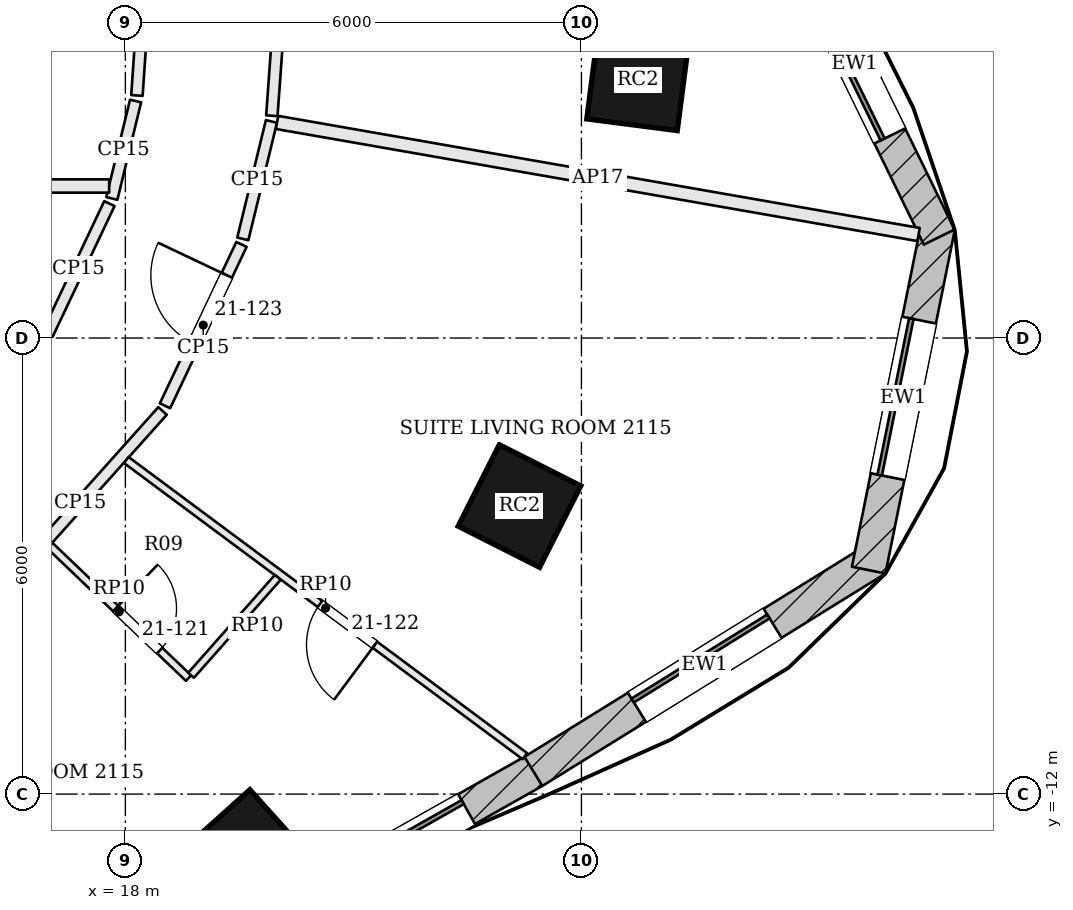
"""IFC4 building model, lengths in metres.
Left out: names, types, materials, properties, quantities, classifications, styles, units other than length and angle.
Written with IfcOpenShell. Run it as: python <this file> out.ifc"""

import sys

from ifc_helpers import new_model, si_unit, direction, frame, frame_2d, origin, origin_2d, place, context, subcontext, project, spatial, rectangle, extrude, element, fill, save


model = new_model("IFC4")
c1 = context("Model", 3, precision=1e-05, world=origin(), true_north=direction((0.0, 1.0)))
c2 = subcontext(c1, "Body", "Model", "MODEL_VIEW")
j1 = project(units=[si_unit("LENGTHUNIT", "METRE"), si_unit("PLANEANGLEUNIT", "RADIAN")], contexts=[c1])
p1 = place(None, origin())
s1 = spatial("IfcSite", under=j1, at=p1, CompositionType="ELEMENT")
p2 = place(p1, origin())
s2 = spatial("IfcBuilding", under=s1, at=p2, CompositionType="ELEMENT")
p3 = place(p2, frame((0.0, 0.0, 92.4)))
s3 = spatial("IfcBuildingStorey", under=s2, at=p3, CompositionType="ELEMENT", Elevation=92.4)
for number, where, z_axis, x_axis in (
    (1, (19.593, -12.79, 0.0), (0.0, 0.0, 1.0), (0.744, 0.668, 0.0)),
    (2, (23.185, -8.21, 0.0), (0.0, 0.0, 1.0), (0.451, 0.893, 0.0)),
    (3, (24.743, -2.599, 0.0), (0.0, 0.0, 1.0), (0.128, 0.992, 0.0)),
):
    element("IfcColumn", number, at=place(p3, frame(where, z_axis=z_axis, x_axis=x_axis)), inside=s3, PredefinedType="COLUMN", context=c2, shape_type="SweptSolid", body=[
        extrude(rectangle(XDim=1.2, YDim=1.2, at=origin_2d()), origin(), (0.0, 0.0, 1.0), 3.6),
    ])
p4 = place(p3, frame((19.776, -13.731, 0.0), z_axis=(0.0, 0.0, 1.0), x_axis=(0.870610133829, 0.491973571318, 0.0)))
e4 = element("IfcWall", 4, at=p4, inside=s3, PredefinedType="SOLIDWALL", context=c2, shape_type="SweptSolid", body=[
    extrude(rectangle(XDim=4.134, YDim=0.45, at=frame_2d((2.067, 0.0))), origin(), (0.0, 0.0, 1.0), 3.4),
])
p5 = place(p4, frame((1.017, 0.0, 0.9)))
e5 = element("IfcOpeningElement", 5, at=p5, cuts=e4, PredefinedType="OPENING", context=c2, shape_type="SweptSolid", body=[
    extrude(rectangle(XDim=2.1, YDim=2.0, at=frame_2d((1.05, 1.0))), frame((0.0, 0.235, 0.0), z_axis=(0.0, -1.0, 0.0), x_axis=(1.0, 0.0, 0.0)), (0.0, 0.0, 1.0), 0.47),
])
p6 = place(p3, frame((23.368, -11.701, 0.0), z_axis=(0.0, 0.0, 1.0), x_axis=(0.850251408633, 0.526376806211, 0.0)))
e6 = element("IfcWall", 6, at=p6, inside=s3, PredefinedType="SOLIDWALL", context=c2, shape_type="SweptSolid", body=[
    extrude(rectangle(XDim=5.302, YDim=0.45, at=frame_2d((2.651, 0.0))), origin(), (0.0, 0.0, 1.0), 3.4),
])
p7 = place(p6, frame((1.601, 0.0, 0.9)))
e7 = element("IfcOpeningElement", 7, at=p7, cuts=e6, PredefinedType="OPENING", context=c2, shape_type="SweptSolid", body=[
    extrude(rectangle(XDim=2.1, YDim=2.0, at=frame_2d((1.05, 1.0))), frame((0.0, 0.235, 0.0), z_axis=(0.0, -1.0, 0.0), x_axis=(1.0, 0.0, 0.0)), (0.0, 0.0, 1.0), 0.47),
])
p8 = place(p3, frame((27.78, -9.053, 0.0), z_axis=(0.0, 0.0, 1.0), x_axis=(0.197796229105, 0.980243159503, 0.0)))
e8 = element("IfcWall", 8, at=p8, inside=s3, PredefinedType="SOLIDWALL", context=c2, shape_type="SweptSolid", body=[
    extrude(rectangle(XDim=4.61, YDim=0.45, at=frame_2d((2.305, 0.0))), origin(), (0.0, 0.0, 1.0), 3.4),
])
p9 = place(p8, frame((1.255, 0.0, 0.9)))
e9 = element("IfcOpeningElement", 9, at=p9, cuts=e8, PredefinedType="OPENING", context=c2, shape_type="SweptSolid", body=[
    extrude(rectangle(XDim=2.1, YDim=2.0, at=frame_2d((1.05, 1.0))), frame((0.0, 0.235, 0.0), z_axis=(0.0, -1.0, 0.0), x_axis=(1.0, 0.0, 0.0)), (0.0, 0.0, 1.0), 0.47),
])
p10 = place(p3, frame((28.707, -4.672, 0.0), z_axis=(0.0, 0.0, 1.0), x_axis=(-0.439053549989, 0.898460895221, 0.0)))
e10 = element("IfcWall", 10, at=p10, inside=s3, PredefinedType="SOLIDWALL", context=c2, shape_type="SweptSolid", body=[
    extrude(rectangle(XDim=5.062, YDim=0.45, at=frame_2d((2.531, 0.0))), origin(), (0.0, 0.0, 1.0), 3.4),
])
p11 = place(p10, frame((1.481, 0.0, 0.9)))
e11 = element("IfcOpeningElement", 11, at=p11, cuts=e10, PredefinedType="OPENING", context=c2, shape_type="SweptSolid", body=[
    extrude(rectangle(XDim=2.1, YDim=2.0, at=frame_2d((1.05, 1.0))), frame((0.0, 0.235, 0.0), z_axis=(0.0, -1.0, 0.0), x_axis=(1.0, 0.0, 0.0)), (0.0, 0.0, 1.0), 0.47),
])
p12 = place(p3, frame((17.193, -17.36, 0.0), z_axis=(0.0, 0.0, 1.0), x_axis=(-0.464005717448, 0.8858322043, 0.0)))
e12 = element("IfcWall", 12, at=p12, inside=s3, PredefinedType="PARTITIONING", context=c2, shape_type="SweptSolid", body=[
    extrude(rectangle(XDim=7.143, YDim=0.175, at=frame_2d((3.571, 0.0))), origin(), (0.0, 0.0, 1.0), 2.784),
])
p13 = place(p3, frame((16.321, -9.383, 0.0), z_axis=(0.0, 0.0, 1.0), x_axis=(0.666834356165, 0.745205972492, 0.0)))
e13 = element("IfcWall", 13, at=p13, inside=s3, PredefinedType="PARTITIONING", context=c2, shape_type="SweptSolid", body=[
    extrude(rectangle(XDim=3.252, YDim=0.15, at=frame_2d((1.626, 0.0))), origin(), (0.0, 0.0, 1.0), 2.784),
])
p14 = place(p3, frame((18.522, -6.891, 0.0), z_axis=(0.0, 0.0, 1.0), x_axis=(0.428157819028, 0.903703979191, 0.0)))
e14 = element("IfcWall", 14, at=p14, inside=s3, PredefinedType="PARTITIONING", context=c2, shape_type="SweptSolid", body=[
    extrude(rectangle(XDim=2.349, YDim=0.15, at=frame_2d((1.175, 0.0))), origin(), (0.0, 0.0, 1.0), 2.784),
])
p15 = place(p14, frame((0.9, 0.0, 0.0)))
e15 = element("IfcOpeningElement", 15, at=p15, cuts=e14, PredefinedType="OPENING", context=c2, shape_type="SweptSolid", body=[
    extrude(rectangle(XDim=1.0, YDim=2.1, at=frame_2d((0.5, 1.05))), frame((0.0, 0.085, 0.0), z_axis=(0.0, -1.0, 0.0), x_axis=(1.0, 0.0, 0.0)), (0.0, 0.0, 1.0), 0.17),
])
p16 = place(p3, frame((19.545, -4.696, 0.0), z_axis=(0.0, 0.0, 1.0), x_axis=(0.236715862945, 0.971578921257, 0.0)))
e16 = element("IfcWall", 16, at=p16, inside=s3, PredefinedType="PARTITIONING", context=c2, shape_type="SweptSolid", body=[
    extrude(rectangle(XDim=1.59, YDim=0.15, at=frame_2d((0.795, 0.0))), origin(), (0.0, 0.0, 1.0), 2.784),
])
p17 = place(p3, frame((28.436, -4.638, 0.0), z_axis=(0.0, 0.0, 1.0), x_axis=(-0.985072773891, 0.172138404023, 0.0)))
e17 = element("IfcWall", 17, at=p17, inside=s3, PredefinedType="PARTITIONING", context=c2, shape_type="SweptSolid", body=[
    extrude(rectangle(XDim=8.568, YDim=0.175, at=frame_2d((4.284, 0.0))), origin(), (0.0, 0.0, 1.0), 2.784),
])
p18 = place(p3, frame((19.927, -3.076, 0.0), z_axis=(0.0, 0.0, 1.0), x_axis=(0.071888451482, 0.997412678155, 0.0)))
e18 = element("IfcWall", 18, at=p18, inside=s3, PredefinedType="PARTITIONING", context=c2, shape_type="SweptSolid", body=[
    extrude(rectangle(XDim=3.084, YDim=0.15, at=frame_2d((1.542, 0.0))), origin(), (0.0, 0.0, 1.0), 2.784),
])
p19 = place(p3, frame((18.34, -0.075, 0.0), z_axis=(0.0, 0.0, 1.0), x_axis=(-0.068328193832, -0.997662897941, 0.0)))
e19 = element("IfcWall", 19, at=p19, inside=s3, PredefinedType="PARTITIONING", context=c2, shape_type="SweptSolid", body=[
    extrude(rectangle(XDim=2.74, YDim=0.15, at=frame_2d((1.37, 0.0))), origin(), (0.0, 0.0, 1.0), 2.784),
])
p20 = place(p3, frame((18.135, -2.882, 0.0), z_axis=(0.0, 0.0, 1.0), x_axis=(-0.236653741324, -0.971594054489, 0.0)))
e20 = element("IfcWall", 20, at=p20, inside=s3, PredefinedType="PARTITIONING", context=c2, shape_type="SweptSolid", body=[
    extrude(rectangle(XDim=1.32, YDim=0.15, at=frame_2d((0.66, 0.0))), origin(), (0.0, 0.0, 1.0), 2.784),
])
p21 = place(p3, frame((17.79, -4.231, 0.0), z_axis=(0.0, 0.0, 1.0), x_axis=(-0.428042272357, -0.90375871397, 0.0)))
e21 = element("IfcWall", 21, at=p21, inside=s3, PredefinedType="PARTITIONING", context=c2, shape_type="SweptSolid", body=[
    extrude(rectangle(XDim=1.905, YDim=0.15, at=frame_2d((0.953, 0.0))), origin(), (0.0, 0.0, 1.0), 2.784),
])
p22 = place(p3, frame((23.256, -11.501, 0.0), z_axis=(0.0, 0.0, 1.0), x_axis=(-0.802700401869, 0.596382482003, 0.0)))
e22 = element("IfcWall", 22, at=p22, inside=s3, PredefinedType="PARTITIONING", context=c2, shape_type="SweptSolid", body=[
    extrude(rectangle(XDim=6.533, YDim=0.1, at=frame_2d((3.267, 0.0))), origin(), (0.0, 0.0, 1.0), 2.884),
])
p23 = place(p22, frame((2.458, 0.0, 0.0)))
e23 = element("IfcOpeningElement", 23, at=p23, cuts=e22, PredefinedType="OPENING", context=c2, shape_type="SweptSolid", body=[
    extrude(rectangle(XDim=0.9, YDim=2.4, at=frame_2d((0.45, 1.2))), frame((0.0, 0.06, 0.0), z_axis=(0.0, -1.0, 0.0), x_axis=(1.0, 0.0, 0.0)), (0.0, 0.0, 1.0), 0.12),
])
p24 = place(p3, frame((17.006, -8.73, 0.0), z_axis=(0.0, 0.0, 1.0), x_axis=(0.722927369978, -0.690924031813, 0.0)))
e24 = element("IfcWall", 24, at=p24, inside=s3, PredefinedType="PARTITIONING", context=c2, shape_type="SweptSolid", body=[
    extrude(rectangle(XDim=2.525, YDim=0.1, at=frame_2d((1.263, 0.0))), origin(), (0.0, 0.0, 1.0), 2.884),
])
p25 = place(p24, frame((1.2, 0.0, 0.0)))
e25 = element("IfcOpeningElement", 25, at=p25, cuts=e24, PredefinedType="OPENING", context=c2, shape_type="SweptSolid", body=[
    extrude(rectangle(XDim=0.8, YDim=2.1, at=frame_2d((0.4, 1.05))), frame((0.0, 0.06, 0.0), z_axis=(0.0, -1.0, 0.0), x_axis=(1.0, 0.0, 0.0)), (0.0, 0.0, 1.0), 0.12),
])
p26 = place(p3, frame((18.865, -10.437, 0.0), z_axis=(0.0, 0.0, 1.0), x_axis=(0.662901257744, 0.748706833468, 0.0)))
e26 = element("IfcWall", 26, at=p26, inside=s3, PredefinedType="PARTITIONING", context=c2, shape_type="SweptSolid", body=[
    extrude(rectangle(XDim=1.721, YDim=0.1, at=frame_2d((0.861, 0.0))), origin(), (0.0, 0.0, 1.0), 2.884),
])
p27 = place(p3, frame((14.875, -4.0, 0.0), z_axis=(0.0, 0.0, 1.0), x_axis=(1.0, 0.0, 0.0)))
e27 = element("IfcWall", 27, at=p27, inside=s3, PredefinedType="PARTITIONING", context=c2, shape_type="SweptSolid", body=[
    extrude(rectangle(XDim=2.912, YDim=0.175, at=frame_2d((1.456, 0.0))), origin(), (0.0, 0.0, 1.0), 2.784),
])
p28 = place(p5, origin())
e28 = element("IfcWindow", 28, at=p28, inside=s3, PartitioningType="SINGLE_PANEL", PredefinedType="WINDOW", context=c2, shape_type="SweptSolid", body=[
    extrude(rectangle(XDim=2.1, YDim=2.0, at=frame_2d((1.05, 1.0))), frame((0.0, 0.135, 0.0), z_axis=(0.0, -1.0, 0.0), x_axis=(1.0, 0.0, 0.0)), (0.0, 0.0, 1.0), 0.06),
])
fill(e5, e28)
p29 = place(p7, origin())
e29 = element("IfcWindow", 29, at=p29, inside=s3, PartitioningType="SINGLE_PANEL", PredefinedType="WINDOW", context=c2, shape_type="SweptSolid", body=[
    extrude(rectangle(XDim=2.1, YDim=2.0, at=frame_2d((1.05, 1.0))), frame((0.0, 0.135, 0.0), z_axis=(0.0, -1.0, 0.0), x_axis=(1.0, 0.0, 0.0)), (0.0, 0.0, 1.0), 0.06),
])
fill(e7, e29)
p30 = place(p9, origin())
e30 = element("IfcWindow", 30, at=p30, inside=s3, PartitioningType="SINGLE_PANEL", PredefinedType="WINDOW", context=c2, shape_type="SweptSolid", body=[
    extrude(rectangle(XDim=2.1, YDim=2.0, at=frame_2d((1.05, 1.0))), frame((0.0, 0.135, 0.0), z_axis=(0.0, -1.0, 0.0), x_axis=(1.0, 0.0, 0.0)), (0.0, 0.0, 1.0), 0.06),
])
fill(e9, e30)
p31 = place(p11, origin())
e31 = element("IfcWindow", 31, at=p31, inside=s3, PartitioningType="SINGLE_PANEL", PredefinedType="WINDOW", context=c2, shape_type="SweptSolid", body=[
    extrude(rectangle(XDim=2.1, YDim=2.0, at=frame_2d((1.05, 1.0))), frame((0.0, 0.135, 0.0), z_axis=(0.0, -1.0, 0.0), x_axis=(1.0, 0.0, 0.0)), (0.0, 0.0, 1.0), 0.06),
])
fill(e11, e31)
p32 = place(p25, origin())
e32 = element("IfcDoor", 32, at=p32, inside=s3, OperationType="SINGLE_SWING_LEFT", PredefinedType="DOOR", context=c2, shape_type="SweptSolid", body=[
    extrude(rectangle(XDim=0.8, YDim=2.1, at=frame_2d((0.4, 1.05))), frame((0.0, 0.025, 0.0), z_axis=(0.0, -1.0, 0.0), x_axis=(1.0, 0.0, 0.0)), (0.0, 0.0, 1.0), 0.05),
])
fill(e25, e32)
p33 = place(p23, origin())
e33 = element("IfcDoor", 33, at=p33, inside=s3, OperationType="SINGLE_SWING_LEFT", PredefinedType="DOOR", context=c2, shape_type="SweptSolid", body=[
    extrude(rectangle(XDim=0.9, YDim=2.4, at=frame_2d((0.45, 1.2))), frame((0.0, 0.025, 0.0), z_axis=(0.0, -1.0, 0.0), x_axis=(1.0, 0.0, 0.0)), (0.0, 0.0, 1.0), 0.05),
])
fill(e23, e33)
p34 = place(p15, origin())
e34 = element("IfcDoor", 34, at=p34, inside=s3, OperationType="SINGLE_SWING_RIGHT", PredefinedType="DOOR", context=c2, shape_type="SweptSolid", body=[
    extrude(rectangle(XDim=1.0, YDim=2.1, at=frame_2d((0.5, 1.05))), frame((0.0, 0.025, 0.0), z_axis=(0.0, -1.0, 0.0), x_axis=(1.0, 0.0, 0.0)), (0.0, 0.0, 1.0), 0.05),
])
fill(e15, e34)
save(model, sys.argv[1])
